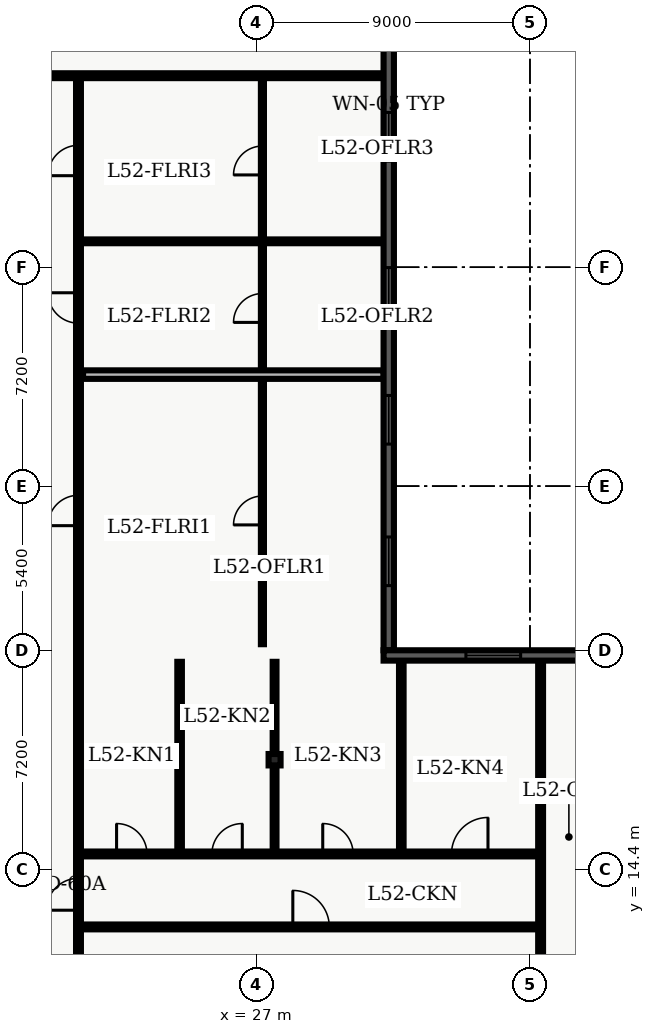
"""IFC4 building model, lengths in metres.
Left out: names, types, materials, properties, quantities, classifications, styles, units other than length and angle.
Written with IfcOpenShell. Run it as: python <this file> out.ifc"""

import sys

from ifc_helpers import new_model, entity, si_unit, converted_unit, direction, frame, origin_with_axes, origin_2d_with_axis, place, context, subcontext, project, spatial, polyline, rectangle, i_section, outline, extrude, element, fill, save


model = new_model("IFC4")
c1 = context("Model", 3, precision=1e-05, world=origin_with_axes(), true_north=direction((0.0, 1.0)))
c2 = subcontext(c1, "Body", "Model", "MODEL_VIEW")
j1 = project(units=[si_unit("LENGTHUNIT", "METRE"), converted_unit("PLANEANGLEUNIT", "DEGREE", entity("IfcPlaneAngleMeasure", 0.017), si_unit("PLANEANGLEUNIT", "RADIAN"), dimensions=[0, 0, 0, 0, 0, 0, 0])], contexts=[c1])
p1 = place(None, origin_with_axes())
s1 = spatial("IfcSite", under=j1, at=p1, CompositionType="ELEMENT")
p2 = place(p1, origin_with_axes())
s2 = spatial("IfcBuilding", under=s1, at=p2, CompositionType="ELEMENT")
p3 = place(p2, frame((0.0, 0.0, 212.1), z_axis=(0.0, 0.0, 1.0), x_axis=(1.0, 0.0, 0.0)))
s3 = spatial("IfcBuildingStorey", under=s2, at=p3, CompositionType="ELEMENT", Elevation=212.1)
p4 = place(p3, frame((27.6, 18.0, 0.0), z_axis=(0.0, 0.0, 1.0), x_axis=(1.0, 0.0, 0.0)))
e1 = element("IfcColumn", 1, at=p4, inside=s3, PredefinedType="COLUMN", context=c2, shape_type="SweptSolid", body=[
    extrude(i_section(OverallWidth=0.394, OverallDepth=0.375, WebThickness=0.017, FlangeThickness=0.028, FilletRadius=0.02, at=origin_2d_with_axis()), origin_with_axes(), (0.0, 0.0, 1.0), 3.9),
])
p5 = place(p3, frame((2.6, 40.5, 0.0), z_axis=(0.0, 0.0, 1.0), x_axis=(1.0, 0.0, 0.0)))
e2 = element("IfcWall", 2, at=p5, inside=s3, PredefinedType="PARTITIONING", context=c2, shape_type="SweptSolid", body=[
    extrude(outline(polyline([(0.0, -0.08), (28.59, -0.08), (28.59, 0.08), (0.0, 0.08), (0.0, -0.08)])), origin_with_axes(), (0.0, 0.0, 1.0), 2.7),
])
p6 = place(p5, frame((8.755, 0.0, 0.0), z_axis=(0.0, 0.0, 1.0), x_axis=(1.0, 0.0, 0.0)))
e3 = element("IfcOpeningElement", 3, at=p6, cuts=e2, PredefinedType="OPENING", context=c2, shape_type="SweptSolid", body=[
    extrude(rectangle(XDim=1.0, YDim=0.18, at=origin_2d_with_axis()), origin_with_axes(), (0.0, 0.0, 1.0), 2.15),
])
p7 = place(p3, frame((21.15, 7.8, 0.0), z_axis=(0.0, 0.0, 1.0), x_axis=(0.0, 1.0, 0.0)))
e4 = element("IfcWall", 4, at=p7, inside=s3, PredefinedType="PARTITIONING", context=c2, shape_type="SweptSolid", body=[
    extrude(outline(polyline([(0.0, -0.08), (32.7, -0.08), (32.7, 0.08), (0.0, 0.08), (0.0, -0.08)])), origin_with_axes(), (0.0, 0.0, 1.0), 2.7),
])
p8 = place(p7, frame((18.399, 0.0, 0.0), z_axis=(0.0, 0.0, 1.0), x_axis=(1.0, 0.0, 0.0)))
e5 = element("IfcOpeningElement", 5, at=p8, cuts=e4, PredefinedType="OPENING", context=c2, shape_type="SweptSolid", body=[
    extrude(rectangle(XDim=1.0, YDim=0.18, at=origin_2d_with_axis()), origin_with_axes(), (0.0, 0.0, 1.0), 2.15),
])
p9 = place(p7, frame((25.06, 0.0, 0.0), z_axis=(0.0, 0.0, 1.0), x_axis=(1.0, 0.0, 0.0)))
e6 = element("IfcOpeningElement", 6, at=p9, cuts=e4, PredefinedType="OPENING", context=c2, shape_type="SweptSolid", body=[
    extrude(rectangle(XDim=1.0, YDim=0.18, at=origin_2d_with_axis()), origin_with_axes(), (0.0, 0.0, 1.0), 2.15),
])
p10 = place(p7, frame((29.911, 0.0, 0.0), z_axis=(0.0, 0.0, 1.0), x_axis=(1.0, 0.0, 0.0)))
e7 = element("IfcOpeningElement", 7, at=p10, cuts=e4, PredefinedType="OPENING", context=c2, shape_type="SweptSolid", body=[
    extrude(rectangle(XDim=1.0, YDim=0.18, at=origin_2d_with_axis()), origin_with_axes(), (0.0, 0.0, 1.0), 2.15),
])
p11 = place(p7, frame((5.775, 0.0, 0.0), z_axis=(0.0, 0.0, 1.0), x_axis=(1.0, 0.0, 0.0)))
e8 = element("IfcOpeningElement", 8, at=p11, cuts=e4, PredefinedType="OPENING", context=c2, shape_type="SweptSolid", body=[
    extrude(rectangle(XDim=1.05, YDim=0.18, at=origin_2d_with_axis()), origin_with_axes(), (0.0, 0.0, 1.0), 2.15),
])
p12 = place(p3, frame((27.2, 21.8, 0.0), z_axis=(0.0, 0.0, 1.0), x_axis=(0.0, 1.0, 0.0)))
e9 = element("IfcWall", 9, at=p12, inside=s3, PredefinedType="PARTITIONING", context=c2, shape_type="SweptSolid", body=[
    extrude(outline(polyline([(0.0, -0.05), (18.5, -0.05), (18.5, 0.05), (0.0, 0.05), (0.0, -0.05)])), origin_with_axes(), (0.0, 0.0, 1.0), 2.7),
])
p13 = place(p12, frame((4.399, 0.0, 0.0), z_axis=(0.0, 0.0, 1.0), x_axis=(1.0, 0.0, 0.0)))
e10 = element("IfcOpeningElement", 10, at=p13, cuts=e9, PredefinedType="OPENING", context=c2, shape_type="SweptSolid", body=[
    extrude(rectangle(XDim=0.95, YDim=0.12, at=origin_2d_with_axis()), origin_with_axes(), (0.0, 0.0, 1.0), 2.15),
])
p14 = place(p12, frame((11.06, 0.0, 0.0), z_axis=(0.0, 0.0, 1.0), x_axis=(1.0, 0.0, 0.0)))
e11 = element("IfcOpeningElement", 11, at=p14, cuts=e9, PredefinedType="OPENING", context=c2, shape_type="SweptSolid", body=[
    extrude(rectangle(XDim=0.95, YDim=0.12, at=origin_2d_with_axis()), origin_with_axes(), (0.0, 0.0, 1.0), 2.15),
])
p15 = place(p12, frame((15.911, 0.0, 0.0), z_axis=(0.0, 0.0, 1.0), x_axis=(1.0, 0.0, 0.0)))
e12 = element("IfcOpeningElement", 12, at=p15, cuts=e9, PredefinedType="OPENING", context=c2, shape_type="SweptSolid", body=[
    extrude(rectangle(XDim=0.95, YDim=0.12, at=origin_2d_with_axis()), origin_with_axes(), (0.0, 0.0, 1.0), 2.15),
])
p16 = place(p3, frame((21.3, 30.668, 0.0), z_axis=(0.0, 0.0, 1.0), x_axis=(1.0, 0.0, 0.0)))
e13 = element("IfcWall", 13, at=p16, inside=s3, PredefinedType="PARTITIONING", context=c2, shape_type="SweptSolid", body=[
    extrude(outline(polyline([(0.0, -0.14), (9.89, -0.14), (9.89, 0.14), (0.0, 0.14), (0.0, -0.14)])), origin_with_axes(), (0.0, 0.0, 1.0), 2.7),
])
p17 = place(p3, frame((21.3, 35.052, 0.0), z_axis=(0.0, 0.0, 1.0), x_axis=(1.0, 0.0, 0.0)))
e14 = element("IfcWall", 14, at=p17, inside=s3, PredefinedType="PARTITIONING", context=c2, shape_type="SweptSolid", body=[
    extrude(outline(polyline([(0.0, -0.062), (9.89, -0.062), (9.89, 0.062), (0.0, 0.062), (0.0, -0.062)])), origin_with_axes(), (0.0, 0.0, 1.0), 2.7),
])
p18 = place(p3, frame((21.15, 12.5, 0.0), z_axis=(0.0, 0.0, 1.0), x_axis=(1.0, 0.0, 0.0)))
e15 = element("IfcWall", 15, at=p18, inside=s3, PredefinedType="PARTITIONING", context=c2, shape_type="SweptSolid", body=[
    extrude(outline(polyline([(0.0, -0.08), (15.2, -0.08), (15.2, 0.08), (0.0, 0.08), (0.0, -0.08)])), origin_with_axes(), (0.0, 0.0, 1.0), 2.7),
])
p19 = place(p18, frame((7.65, 0.0, 0.0), z_axis=(0.0, 0.0, 1.0), x_axis=(1.0, 0.0, 0.0)))
e16 = element("IfcOpeningElement", 16, at=p19, cuts=e15, PredefinedType="OPENING", context=c2, shape_type="SweptSolid", body=[
    extrude(rectangle(XDim=1.2, YDim=0.18, at=origin_2d_with_axis()), origin_with_axes(), (0.0, 0.0, 1.0), 2.2),
])
p20 = place(p3, frame((21.15, 14.9, 0.0), z_axis=(0.0, 0.0, 1.0), x_axis=(1.0, 0.0, 0.0)))
e17 = element("IfcWall", 17, at=p20, inside=s3, PredefinedType="PARTITIONING", context=c2, shape_type="SweptSolid", body=[
    extrude(outline(polyline([(0.0, -0.08), (15.2, -0.08), (15.2, 0.08), (0.0, 0.08), (0.0, -0.08)])), origin_with_axes(), (0.0, 0.0, 1.0), 2.7),
])
p21 = place(p20, frame((1.753, 0.0, 0.0), z_axis=(0.0, 0.0, 1.0), x_axis=(1.0, 0.0, 0.0)))
e18 = element("IfcOpeningElement", 18, at=p21, cuts=e17, PredefinedType="OPENING", context=c2, shape_type="SweptSolid", body=[
    extrude(rectangle(XDim=1.0, YDim=0.18, at=origin_2d_with_axis()), origin_with_axes(), (0.0, 0.0, 1.0), 2.15),
])
p22 = place(p20, frame((4.888, 0.0, 0.0), z_axis=(0.0, 0.0, 1.0), x_axis=(1.0, 0.0, 0.0)))
e19 = element("IfcOpeningElement", 19, at=p22, cuts=e17, PredefinedType="OPENING", context=c2, shape_type="SweptSolid", body=[
    extrude(rectangle(XDim=1.0, YDim=0.18, at=origin_2d_with_axis()), origin_with_axes(), (0.0, 0.0, 1.0), 2.15),
])
p23 = place(p20, frame((8.534, 0.0, 0.0), z_axis=(0.0, 0.0, 1.0), x_axis=(1.0, 0.0, 0.0)))
e20 = element("IfcOpeningElement", 20, at=p23, cuts=e17, PredefinedType="OPENING", context=c2, shape_type="SweptSolid", body=[
    extrude(rectangle(XDim=1.0, YDim=0.18, at=origin_2d_with_axis()), origin_with_axes(), (0.0, 0.0, 1.0), 2.15),
])
p24 = place(p20, frame((12.869, 0.0, 0.0), z_axis=(0.0, 0.0, 1.0), x_axis=(1.0, 0.0, 0.0)))
e21 = element("IfcOpeningElement", 21, at=p24, cuts=e17, PredefinedType="OPENING", context=c2, shape_type="SweptSolid", body=[
    extrude(rectangle(XDim=1.2, YDim=0.18, at=origin_2d_with_axis()), origin_with_axes(), (0.0, 0.0, 1.0), 2.2),
])
p25 = place(p3, frame((36.35, 4.35, 0.0), z_axis=(0.0, 0.0, 1.0), x_axis=(0.0, 1.0, 0.0)))
e22 = element("IfcWall", 22, at=p25, inside=s3, PredefinedType="PARTITIONING", context=c2, shape_type="SweptSolid", body=[
    extrude(outline(polyline([(0.0, -0.08), (16.95, -0.08), (16.95, 0.08), (0.0, 0.08), (0.0, -0.08)])), origin_with_axes(), (0.0, 0.0, 1.0), 2.7),
])
p26 = place(p3, frame((24.476, 15.02, 0.0), z_axis=(0.0, 0.0, 1.0), x_axis=(0.0, 1.0, 0.0)))
e23 = element("IfcWall", 23, at=p26, inside=s3, PredefinedType="PARTITIONING", context=c2, shape_type="SweptSolid", body=[
    extrude(outline(polyline([(0.0, -0.075), (6.2, -0.075), (6.2, 0.075), (0.0, 0.075), (0.0, -0.075)])), origin_with_axes(), (0.0, 0.0, 1.0), 2.7),
])
p27 = place(p3, frame((27.6, 15.02, 0.0), z_axis=(0.0, 0.0, 1.0), x_axis=(0.0, 1.0, 0.0)))
e24 = element("IfcWall", 24, at=p27, inside=s3, PredefinedType="PARTITIONING", context=c2, shape_type="SweptSolid", body=[
    extrude(outline(polyline([(0.0, -0.062), (6.2, -0.062), (6.2, 0.062), (0.0, 0.062), (0.0, -0.062)])), origin_with_axes(), (0.0, 0.0, 1.0), 2.7),
])
p28 = place(p3, frame((31.768, 15.02, 0.0), z_axis=(0.0, 0.0, 1.0), x_axis=(0.0, 1.0, 0.0)))
e25 = element("IfcWall", 25, at=p28, inside=s3, PredefinedType="PARTITIONING", context=c2, shape_type="SweptSolid", body=[
    extrude(outline(polyline([(0.0, -0.075), (6.245, -0.075), (6.245, 0.075), (0.0, 0.075), (0.0, -0.075)])), origin_with_axes(), (0.0, 0.0, 1.0), 2.7),
])
p29 = place(p3, frame((31.355, 41.42, 0.0), z_axis=(0.0, 0.0, 1.0), x_axis=(0.0, -1.0, 0.0)))
e26 = element("IfcWall", 26, at=p29, inside=s3, PredefinedType="SOLIDWALL", context=c2, shape_type="SweptSolid", body=[
    extrude(outline(polyline([(0.0, -0.17), (19.82, -0.17), (19.82, 0.17), (0.0, 0.17), (0.0, -0.17)])), origin_with_axes(), (0.0, 0.0, 1.0), 3.66),
])
p30 = place(p29, frame((2.928, 0.0, 0.45), z_axis=(0.0, 0.0, 1.0), x_axis=(1.0, 0.0, 0.0)))
e27 = element("IfcOpeningElement", 27, at=p30, cuts=e26, PredefinedType="OPENING", context=c2, shape_type="SweptSolid", body=[
    extrude(rectangle(XDim=1.6, YDim=0.36, at=origin_2d_with_axis()), origin_with_axes(), (0.0, 0.0, 1.0), 2.2),
])
p31 = place(p29, frame((8.032, 0.0, 0.45), z_axis=(0.0, 0.0, 1.0), x_axis=(1.0, 0.0, 0.0)))
e28 = element("IfcOpeningElement", 28, at=p31, cuts=e26, PredefinedType="OPENING", context=c2, shape_type="SweptSolid", body=[
    extrude(rectangle(XDim=1.6, YDim=0.36, at=origin_2d_with_axis()), origin_with_axes(), (0.0, 0.0, 1.0), 2.2),
])
p32 = place(p29, frame((12.238, 0.0, 0.45), z_axis=(0.0, 0.0, 1.0), x_axis=(1.0, 0.0, 0.0)))
e29 = element("IfcOpeningElement", 29, at=p32, cuts=e26, PredefinedType="OPENING", context=c2, shape_type="SweptSolid", body=[
    extrude(rectangle(XDim=1.6, YDim=0.36, at=origin_2d_with_axis()), origin_with_axes(), (0.0, 0.0, 1.0), 2.2),
])
p33 = place(p29, frame((16.893, 0.0, 0.45), z_axis=(0.0, 0.0, 1.0), x_axis=(1.0, 0.0, 0.0)))
e30 = element("IfcOpeningElement", 30, at=p33, cuts=e26, PredefinedType="OPENING", context=c2, shape_type="SweptSolid", body=[
    extrude(rectangle(XDim=1.6, YDim=0.36, at=origin_2d_with_axis()), origin_with_axes(), (0.0, 0.0, 1.0), 2.2),
])
p34 = place(p3, frame((31.185, 21.43, 0.0), z_axis=(0.0, 0.0, 1.0), x_axis=(1.0, 0.0, 0.0)))
e31 = element("IfcWall", 31, at=p34, inside=s3, PredefinedType="SOLIDWALL", context=c2, shape_type="SweptSolid", body=[
    extrude(outline(polyline([(0.0, -0.17), (7.215, -0.17), (7.215, 0.17), (0.0, 0.17), (0.0, -0.17)])), origin_with_axes(), (0.0, 0.0, 1.0), 3.66),
])
p35 = place(p34, frame((3.608, 0.0, 0.45), z_axis=(0.0, 0.0, 1.0), x_axis=(1.0, 0.0, 0.0)))
e32 = element("IfcOpeningElement", 32, at=p35, cuts=e31, PredefinedType="OPENING", context=c2, shape_type="SweptSolid", body=[
    extrude(rectangle(XDim=1.8, YDim=0.36, at=origin_2d_with_axis()), origin_with_axes(), (0.0, 0.0, 1.0), 2.1),
])
p36 = place(p12, frame((4.399, 0.0, 0.0), z_axis=(0.0, 0.0, 1.0), x_axis=(1.0, 0.0, 0.0)))
e33 = element("IfcDoor", 33, at=p36, inside=s3, OperationType="SINGLE_SWING_LEFT", PredefinedType="DOOR", context=c2, shape_type="SweptSolid", body=[
    extrude(rectangle(XDim=0.95, YDim=0.06, at=origin_2d_with_axis()), origin_with_axes(), (0.0, 0.0, 1.0), 2.15),
])
fill(e10, e33)
p37 = place(p7, frame((18.399, 0.0, 0.0), z_axis=(0.0, 0.0, 1.0), x_axis=(1.0, 0.0, 0.0)))
e34 = element("IfcDoor", 34, at=p37, inside=s3, OperationType="SINGLE_SWING_LEFT", PredefinedType="DOOR", context=c2, shape_type="SweptSolid", body=[
    extrude(rectangle(XDim=1.0, YDim=0.09, at=origin_2d_with_axis()), origin_with_axes(), (0.0, 0.0, 1.0), 2.15),
])
fill(e5, e34)
p38 = place(p12, frame((11.06, 0.0, 0.0), z_axis=(0.0, 0.0, 1.0), x_axis=(1.0, 0.0, 0.0)))
e35 = element("IfcDoor", 35, at=p38, inside=s3, OperationType="SINGLE_SWING_LEFT", PredefinedType="DOOR", context=c2, shape_type="SweptSolid", body=[
    extrude(rectangle(XDim=0.95, YDim=0.06, at=origin_2d_with_axis()), origin_with_axes(), (0.0, 0.0, 1.0), 2.15),
])
fill(e11, e35)
p39 = place(p7, frame((25.06, 0.0, 0.0), z_axis=(0.0, 0.0, 1.0), x_axis=(1.0, 0.0, 0.0)))
e36 = element("IfcDoor", 36, at=p39, inside=s3, OperationType="SINGLE_SWING_RIGHT", PredefinedType="DOOR", context=c2, shape_type="SweptSolid", body=[
    extrude(rectangle(XDim=1.0, YDim=0.09, at=origin_2d_with_axis()), origin_with_axes(), (0.0, 0.0, 1.0), 2.15),
])
fill(e6, e36)
p40 = place(p12, frame((15.911, 0.0, 0.0), z_axis=(0.0, 0.0, 1.0), x_axis=(1.0, 0.0, 0.0)))
e37 = element("IfcDoor", 37, at=p40, inside=s3, OperationType="SINGLE_SWING_LEFT", PredefinedType="DOOR", context=c2, shape_type="SweptSolid", body=[
    extrude(rectangle(XDim=0.95, YDim=0.06, at=origin_2d_with_axis()), origin_with_axes(), (0.0, 0.0, 1.0), 2.15),
])
fill(e12, e37)
p41 = place(p7, frame((29.911, 0.0, 0.0), z_axis=(0.0, 0.0, 1.0), x_axis=(1.0, 0.0, 0.0)))
e38 = element("IfcDoor", 38, at=p41, inside=s3, OperationType="SINGLE_SWING_LEFT", PredefinedType="DOOR", context=c2, shape_type="SweptSolid", body=[
    extrude(rectangle(XDim=1.0, YDim=0.09, at=origin_2d_with_axis()), origin_with_axes(), (0.0, 0.0, 1.0), 2.15),
])
fill(e7, e38)
p42 = place(p7, frame((5.775, 0.0, 0.0), z_axis=(0.0, 0.0, 1.0), x_axis=(1.0, 0.0, 0.0)))
e39 = element("IfcDoor", 39, at=p42, inside=s3, OperationType="SINGLE_SWING_LEFT", PredefinedType="DOOR", context=c2, shape_type="SweptSolid", body=[
    extrude(rectangle(XDim=1.05, YDim=0.09, at=origin_2d_with_axis()), origin_with_axes(), (0.0, 0.0, 1.0), 2.15),
])
fill(e8, e39)
p43 = place(p18, frame((7.65, 0.0, 0.0), z_axis=(0.0, 0.0, 1.0), x_axis=(1.0, 0.0, 0.0)))
e40 = element("IfcDoor", 40, at=p43, inside=s3, OperationType="SINGLE_SWING_LEFT", PredefinedType="DOOR", context=c2, shape_type="SweptSolid", body=[
    extrude(rectangle(XDim=1.2, YDim=0.09, at=origin_2d_with_axis()), origin_with_axes(), (0.0, 0.0, 1.0), 2.2),
])
fill(e16, e40)
p44 = place(p20, frame((1.753, 0.0, 0.0), z_axis=(0.0, 0.0, 1.0), x_axis=(1.0, 0.0, 0.0)))
e41 = element("IfcDoor", 41, at=p44, inside=s3, OperationType="SINGLE_SWING_LEFT", PredefinedType="DOOR", context=c2, shape_type="SweptSolid", body=[
    extrude(rectangle(XDim=1.0, YDim=0.09, at=origin_2d_with_axis()), origin_with_axes(), (0.0, 0.0, 1.0), 2.15),
])
fill(e18, e41)
p45 = place(p20, frame((4.888, 0.0, 0.0), z_axis=(0.0, 0.0, 1.0), x_axis=(1.0, 0.0, 0.0)))
e42 = element("IfcDoor", 42, at=p45, inside=s3, OperationType="SINGLE_SWING_RIGHT", PredefinedType="DOOR", context=c2, shape_type="SweptSolid", body=[
    extrude(rectangle(XDim=1.0, YDim=0.09, at=origin_2d_with_axis()), origin_with_axes(), (0.0, 0.0, 1.0), 2.15),
])
fill(e19, e42)
p46 = place(p20, frame((8.534, 0.0, 0.0), z_axis=(0.0, 0.0, 1.0), x_axis=(1.0, 0.0, 0.0)))
e43 = element("IfcDoor", 43, at=p46, inside=s3, OperationType="SINGLE_SWING_LEFT", PredefinedType="DOOR", context=c2, shape_type="SweptSolid", body=[
    extrude(rectangle(XDim=1.0, YDim=0.09, at=origin_2d_with_axis()), origin_with_axes(), (0.0, 0.0, 1.0), 2.15),
])
fill(e20, e43)
p47 = place(p20, frame((12.869, 0.0, 0.0), z_axis=(0.0, 0.0, 1.0), x_axis=(1.0, 0.0, 0.0)))
e44 = element("IfcDoor", 44, at=p47, inside=s3, OperationType="SINGLE_SWING_RIGHT", PredefinedType="DOOR", context=c2, shape_type="SweptSolid", body=[
    extrude(rectangle(XDim=1.2, YDim=0.09, at=origin_2d_with_axis()), origin_with_axes(), (0.0, 0.0, 1.0), 2.2),
])
fill(e21, e44)
p48 = place(p29, frame((2.928, 0.0, 0.45), z_axis=(0.0, 0.0, 1.0), x_axis=(1.0, 0.0, 0.0)))
e45 = element("IfcWindow", 45, at=p48, inside=s3, PredefinedType="WINDOW", context=c2, shape_type="SweptSolid", body=[
    extrude(rectangle(XDim=1.6, YDim=0.09, at=origin_2d_with_axis()), origin_with_axes(), (0.0, 0.0, 1.0), 2.2),
])
fill(e27, e45)
p49 = place(p29, frame((8.032, 0.0, 0.45), z_axis=(0.0, 0.0, 1.0), x_axis=(1.0, 0.0, 0.0)))
e46 = element("IfcWindow", 46, at=p49, inside=s3, PredefinedType="WINDOW", context=c2, shape_type="SweptSolid", body=[
    extrude(rectangle(XDim=1.6, YDim=0.09, at=origin_2d_with_axis()), origin_with_axes(), (0.0, 0.0, 1.0), 2.2),
])
fill(e28, e46)
p50 = place(p29, frame((12.238, 0.0, 0.45), z_axis=(0.0, 0.0, 1.0), x_axis=(1.0, 0.0, 0.0)))
e47 = element("IfcWindow", 47, at=p50, inside=s3, PredefinedType="WINDOW", context=c2, shape_type="SweptSolid", body=[
    extrude(rectangle(XDim=1.6, YDim=0.09, at=origin_2d_with_axis()), origin_with_axes(), (0.0, 0.0, 1.0), 2.2),
])
fill(e29, e47)
p51 = place(p29, frame((16.893, 0.0, 0.45), z_axis=(0.0, 0.0, 1.0), x_axis=(1.0, 0.0, 0.0)))
e48 = element("IfcWindow", 48, at=p51, inside=s3, PredefinedType="WINDOW", context=c2, shape_type="SweptSolid", body=[
    extrude(rectangle(XDim=1.6, YDim=0.09, at=origin_2d_with_axis()), origin_with_axes(), (0.0, 0.0, 1.0), 2.2),
])
fill(e30, e48)
p52 = place(p34, frame((3.608, 0.0, 0.45), z_axis=(0.0, 0.0, 1.0), x_axis=(1.0, 0.0, 0.0)))
e49 = element("IfcWindow", 49, at=p52, inside=s3, PredefinedType="WINDOW", context=c2, shape_type="SweptSolid", body=[
    extrude(rectangle(XDim=1.8, YDim=0.09, at=origin_2d_with_axis()), origin_with_axes(), (0.0, 0.0, 1.0), 2.1),
])
fill(e32, e49)
save(model, sys.argv[1])
